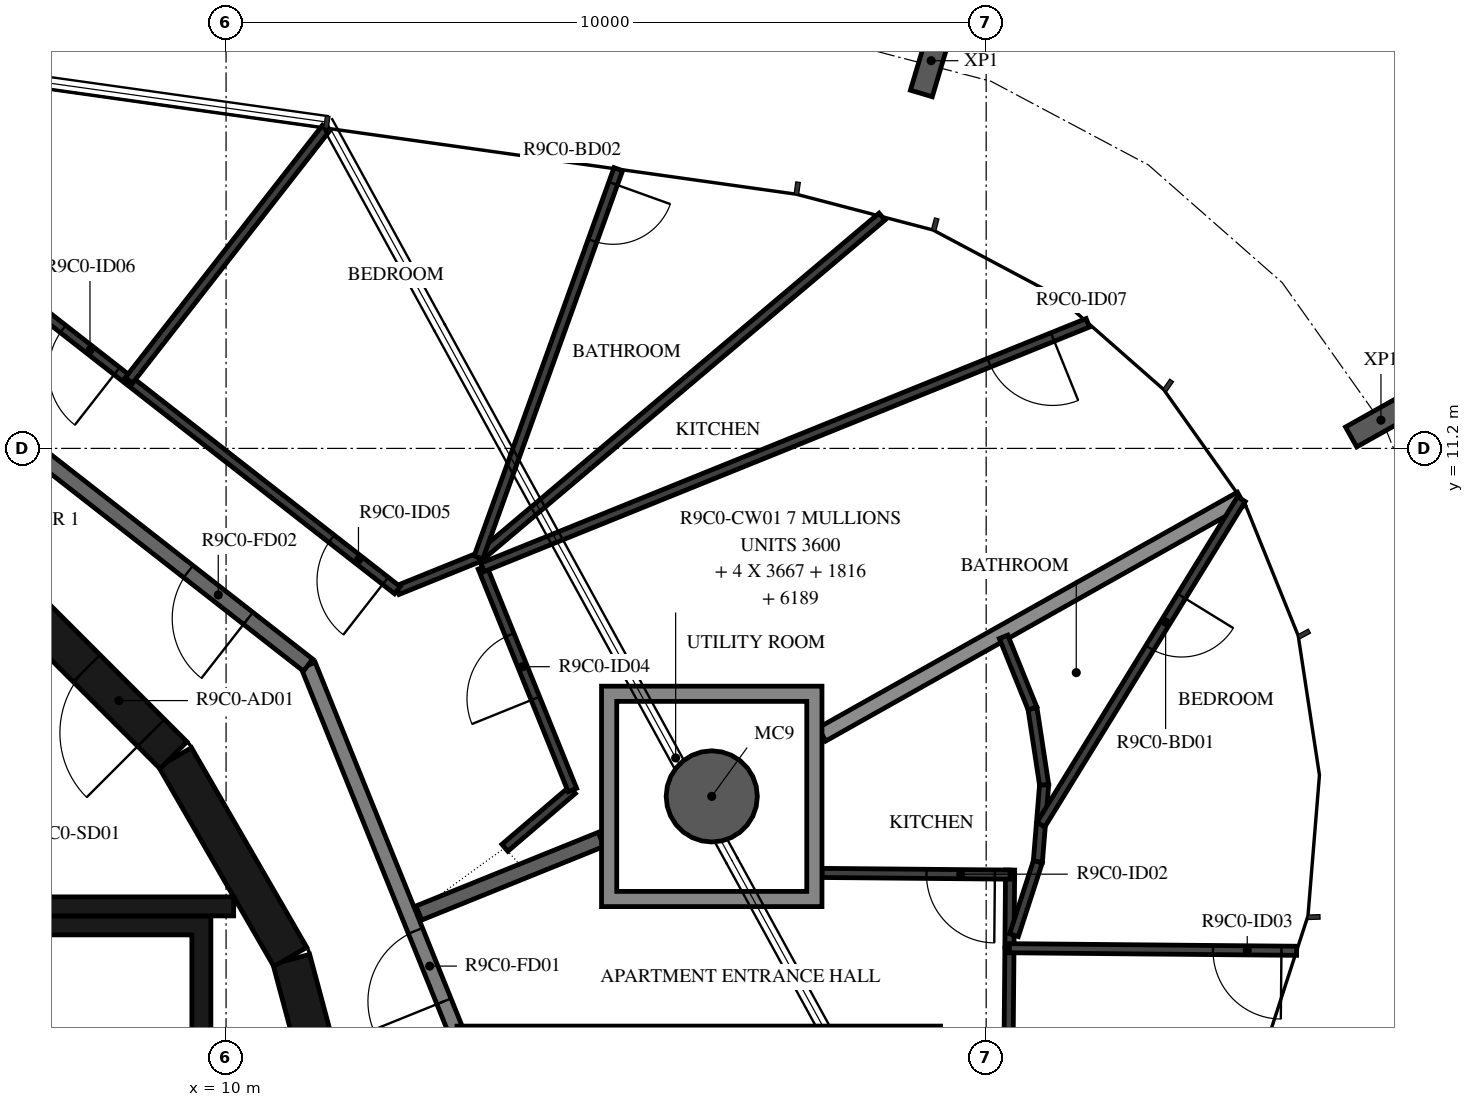
"""IFC4 building model, lengths in metres.
Left out: names, types, materials, properties, quantities, classifications, styles, units other than length and angle.
Written with IfcOpenShell. Run it as: python <this file> out.ifc"""

import sys

from ifc_helpers import new_model, si_unit, direction, frame, frame_2d, origin, origin_2d, place, context, subcontext, project, spatial, polyline, rectangle, hollow_circle, i_section, outline, extrude, element, fill, save


model = new_model("IFC4")
c1 = context("Model", 3, precision=1e-05, world=origin(), true_north=direction((0.0, 1.0)))
c2 = subcontext(c1, "Body", "Model", "MODEL_VIEW")
j1 = project(units=[si_unit("LENGTHUNIT", "METRE"), si_unit("PLANEANGLEUNIT", "RADIAN")], contexts=[c1])
p1 = place(None, origin())
s1 = spatial("IfcSite", under=j1, at=p1, CompositionType="ELEMENT")
p2 = place(p1, origin())
s2 = spatial("IfcBuilding", under=s1, at=p2, CompositionType="ELEMENT")
p3 = place(p2, frame((0.0, 0.0, 354.0)))
s3 = spatial("IfcBuildingStorey", under=s2, at=p3, CompositionType="ELEMENT", Elevation=354.0)
p4 = place(p3, frame((16.39, 6.622, -0.38), z_axis=(0.0, 0.0, 1.0), x_axis=(1.0, 0.0, 0.0)))
e1 = element("IfcColumn", 1, at=p4, inside=s3, PredefinedType="COLUMN", context=c2, shape_type="SweptSolid", body=[
    extrude(hollow_circle(Radius=0.6, WallThickness=0.03, at=origin_2d()), origin(), (0.0, 0.0, 1.0), 3.5),
])
for number, where, z_axis, x_axis in (
    (2, (25.194, 11.571, -0.38), (0.0, 0.0, 1.0), (0.49, -0.872, 0.0)),
    (3, (19.276, 16.301, -0.38), (0.0, 0.0, 1.0), (0.958, -0.286, 0.0)),
):
    element("IfcColumn", number, at=place(p3, frame(where, z_axis=z_axis, x_axis=x_axis)), inside=s3, PredefinedType="COLUMN", context=c2, shape_type="SweptSolid", body=[
        extrude(i_section(OverallWidth=0.3, OverallDepth=0.9, WebThickness=0.019, FlangeThickness=0.035, FilletRadius=0.03, at=origin_2d()), origin(), (0.0, 0.0, 1.0), 3.5),
    ])
for number, where, z_axis, x_axis in (
    (4, (11.643, 1.55, 0.0), (0.0, 0.0, 1.0), (-0.259, 0.966, 0.0)),
    (5, (10.845, 4.51, 0.0), (0.0, 0.0, 1.0), (-0.5, 0.866, 0.0)),
):
    element("IfcWall", number, at=place(p3, frame(where, z_axis=z_axis, x_axis=x_axis)), inside=s3, PredefinedType="SHEAR", context=c2, shape_type="SweptSolid", body=[
        extrude(rectangle(XDim=3.033, YDim=0.5, at=frame_2d((1.516, 0.0))), origin(), (0.0, 0.0, 1.0), 3.12),
    ])
p5 = place(p3, frame((9.308, 7.164, 0.0), z_axis=(0.0, 0.0, 1.0), x_axis=(-0.707106781187, 0.707106781187, 0.0)))
e6 = element("IfcWall", 6, at=p5, inside=s3, PredefinedType="SHEAR", context=c2, shape_type="SweptSolid", body=[
    extrude(rectangle(XDim=3.032, YDim=0.5, at=frame_2d((1.516, 0.0))), origin(), (0.0, 0.0, 1.0), 3.12),
])
p6 = place(p5, frame((0.416, 0.0, 0.0)))
e7 = element("IfcOpeningElement", 7, at=p6, cuts=e6, PredefinedType="OPENING", context=c2, shape_type="SweptSolid", body=[
    extrude(rectangle(XDim=1.2, YDim=2.1, at=frame_2d((0.6, 1.05))), frame((0.0, 0.26, 0.0), z_axis=(0.0, -1.0, 0.0), x_axis=(1.0, 0.0, 0.0)), (0.0, 0.0, 1.0), 0.52),
])
p7 = place(p3, frame((7.0, 5.175, 0.0), z_axis=(0.0, 0.0, 1.0), x_axis=(1.0, 0.0, 0.0)))
e8 = element("IfcWall", 8, at=p7, inside=s3, PredefinedType="SHEAR", context=c2, shape_type="SweptSolid", body=[
    extrude(rectangle(XDim=3.1, YDim=0.25, at=frame_2d((1.55, 0.0))), origin(), (0.0, 0.0, 1.0), 3.12),
])
p8 = place(p3, origin())
e9 = element("IfcWall", 9, at=p8, inside=s3, PredefinedType="SHEAR", context=c2, shape_type="SweptSolid", body=[
    extrude(outline(polyline([(-9.8, 1.9), (-9.55, 1.9), (-9.55, 4.8), (3.1, 4.8), (3.1, 1.9), (3.35, 1.9), (3.35, 4.8), (5.25, 4.8), (5.25, 1.9), (5.5, 1.9), (5.5, 4.8), (7.4, 4.8), (7.4, 1.9), (7.65, 1.9), (7.65, 4.8), (9.55, 4.8), (9.55, 1.9), (9.8, 1.9), (9.8, 4.8), (9.8, 5.05), (-9.8, 5.05), (-9.8, 4.8), (-9.8, 1.9)])), origin(), (0.0, 0.0, 1.0), 3.12),
])
p9 = place(p3, frame((13.769, 1.691, 0.0), z_axis=(0.0, 0.0, 1.0), x_axis=(-0.374618189599, 0.92717916932, 0.0)))
e10 = element("IfcWall", 10, at=p9, inside=s3, PredefinedType="STANDARD", context=c2, shape_type="SweptSolid", body=[
    extrude(rectangle(XDim=7.181, YDim=0.2, at=frame_2d((3.591, 0.0))), origin(), (0.0, 0.0, 1.0), 3.12),
])
p10 = place(p9, frame((2.41, 0.0, 0.0)))
e11 = element("IfcOpeningElement", 11, at=p10, cuts=e10, PredefinedType="OPENING", context=c2, shape_type="SweptSolid", body=[
    extrude(rectangle(XDim=1.0, YDim=2.1, at=frame_2d((0.5, 1.05))), frame((0.0, 0.11, 0.0), z_axis=(0.0, -1.0, 0.0), x_axis=(1.0, 0.0, 0.0)), (0.0, 0.0, 1.0), 0.22),
])
p11 = place(p3, frame((11.079, 8.349, 0.0), z_axis=(0.0, 0.0, 1.0), x_axis=(-0.78800478687, 0.615669112324, 0.0)))
e12 = element("IfcWall", 12, at=p11, inside=s3, PredefinedType="STANDARD", context=c2, shape_type="SweptSolid", body=[
    extrude(rectangle(XDim=7.181, YDim=0.2, at=frame_2d((3.591, 0.0))), origin(), (0.0, 0.0, 1.0), 3.12),
])
p12 = place(p11, frame((1.0, 0.0, 0.0)))
e13 = element("IfcOpeningElement", 13, at=p12, cuts=e12, PredefinedType="OPENING", context=c2, shape_type="SweptSolid", body=[
    extrude(rectangle(XDim=1.0, YDim=2.1, at=frame_2d((0.5, 1.05))), frame((0.0, 0.11, 0.0), z_axis=(0.0, -1.0, 0.0), x_axis=(1.0, 0.0, 0.0)), (0.0, 0.0, 1.0), 0.22),
])
p13 = place(p3, frame((19.4, 3.5, 0.0), z_axis=(0.0, 0.0, 1.0), x_axis=(-1.0, 0.0, 0.0)))
e14 = element("IfcWall", 14, at=p13, inside=s3, PredefinedType="STANDARD", context=c2, shape_type="SweptSolid", body=[
    extrude(rectangle(XDim=6.362, YDim=0.2, at=frame_2d((3.181, 0.0))), origin(), (0.0, 0.0, 1.0), 3.12),
])
p14 = place(p3, frame((14.934, 6.056, 0.0), z_axis=(0.0, 0.0, 1.0), x_axis=(-0.927181938396, -0.374611336071, 0.0)))
e15 = element("IfcWall", 15, at=p14, inside=s3, PredefinedType="STANDARD", context=c2, shape_type="SweptSolid", body=[
    extrude(rectangle(XDim=2.586, YDim=0.2, at=frame_2d((1.293, 0.0))), origin(), (0.0, 0.0, 1.0), 3.12),
])
p15 = place(p3, frame((23.354, 10.537, 0.0), z_axis=(0.0, 0.0, 1.0), x_axis=(-0.871719790551, -0.490004700754, 0.0)))
e16 = element("IfcWall", 16, at=p15, inside=s3, PredefinedType="STANDARD", context=c2, shape_type="SweptSolid", body=[
    extrude(rectangle(XDim=6.326, YDim=0.2, at=frame_2d((3.163, 0.0))), origin(), (0.0, 0.0, 1.0), 2.73),
])
p16 = place(p3, frame((20.285, 2.293, 0.0), z_axis=(0.0, 0.0, 1.0), x_axis=(0.008900171034, 0.999960392693, 0.0)))
e17 = element("IfcWall", 17, at=p16, inside=s3, PredefinedType="PARTITIONING", context=c2, shape_type="SweptSolid", body=[
    extrude(rectangle(XDim=2.332, YDim=0.12, at=frame_2d((1.166, 0.0))), origin(), (0.0, 0.0, 1.0), 3.12),
])
p17 = place(p16, frame((0.2, 0.0, 0.0)))
e18 = element("IfcOpeningElement", 18, at=p17, cuts=e17, PredefinedType="OPENING", context=c2, shape_type="SweptSolid", body=[
    extrude(rectangle(XDim=0.9, YDim=2.1, at=frame_2d((0.45, 1.05))), frame((0.0, 0.07, 0.0), z_axis=(0.0, -1.0, 0.0), x_axis=(1.0, 0.0, 0.0)), (0.0, 0.0, 1.0), 0.14),
])
p18 = place(p3, frame((20.306, 4.639, 0.0), z_axis=(0.0, 0.0, 1.0), x_axis=(0.008906724211, 0.999960334345, 0.0)))
e19 = element("IfcWall", 19, at=p18, inside=s3, PredefinedType="PARTITIONING", context=c2, shape_type="SweptSolid", body=[
    extrude(rectangle(XDim=1.014, YDim=0.12, at=frame_2d((0.507, 0.0))), origin(), (0.0, 0.0, 1.0), 3.12),
])
p19 = place(p3, frame((20.315, 5.593, 0.0), z_axis=(0.0, 0.0, 1.0), x_axis=(-0.999960597409, 0.008877140833, 0.0)))
e20 = element("IfcWall", 20, at=p19, inside=s3, PredefinedType="PARTITIONING", context=c2, shape_type="SweptSolid", body=[
    extrude(rectangle(XDim=2.475, YDim=0.12, at=frame_2d((1.238, 0.0))), origin(), (0.0, 0.0, 1.0), 3.12),
])
p20 = place(p19, frame((0.2, 0.0, 0.0)))
e21 = element("IfcOpeningElement", 21, at=p20, cuts=e20, PredefinedType="OPENING", context=c2, shape_type="SweptSolid", body=[
    extrude(rectangle(XDim=0.9, YDim=2.1, at=frame_2d((0.45, 1.05))), frame((0.0, 0.07, 0.0), z_axis=(0.0, -1.0, 0.0), x_axis=(1.0, 0.0, 0.0)), (0.0, 0.0, 1.0), 0.14),
])
p21 = place(p3, frame((24.085, 4.591, 0.0), z_axis=(0.0, 0.0, 1.0), x_axis=(-0.99996025077, 0.008916102255, 0.0)))
e22 = element("IfcWall", 22, at=p21, inside=s3, PredefinedType="PARTITIONING", context=c2, shape_type="SweptSolid", body=[
    extrude(rectangle(XDim=3.779, YDim=0.12, at=frame_2d((1.889, 0.0))), origin(), (0.0, 0.0, 1.0), 2.73),
])
p22 = place(p21, frame((0.2, 0.0, 0.0)))
e23 = element("IfcOpeningElement", 23, at=p22, cuts=e22, PredefinedType="OPENING", context=c2, shape_type="SweptSolid", body=[
    extrude(rectangle(XDim=0.9, YDim=2.1, at=frame_2d((0.45, 1.05))), frame((0.0, 0.07, 0.0), z_axis=(0.0, -1.0, 0.0), x_axis=(1.0, 0.0, 0.0)), (0.0, 0.0, 1.0), 0.14),
])
p23 = place(p3, frame((20.762, 6.775, 0.0), z_axis=(0.0, 0.0, 1.0), x_axis=(-0.08121587, -0.996696534789, 0.0)))
e24 = element("IfcWall", 24, at=p23, inside=s3, PredefinedType="PARTITIONING", context=c2, shape_type="SweptSolid", body=[
    extrude(rectangle(XDim=1.016, YDim=0.12, at=frame_2d((0.508, 0.0))), origin(), (0.0, 0.0, 1.0), 3.12),
])
p24 = place(p3, frame((20.68, 5.762, 0.0), z_axis=(0.0, 0.0, 1.0), x_axis=(-0.30908063779, -0.951035834942, 0.0)))
e25 = element("IfcWall", 25, at=p24, inside=s3, PredefinedType="PARTITIONING", context=c2, shape_type="SweptSolid", body=[
    extrude(rectangle(XDim=1.016, YDim=0.12, at=frame_2d((0.508, 0.0))), origin(), (0.0, 0.0, 1.0), 3.12),
])
p25 = place(p3, frame((23.357, 10.532, 0.0), z_axis=(0.0, 0.0, 1.0), x_axis=(-0.524476563806, -0.851424884542, 0.0)))
e26 = element("IfcWall", 26, at=p25, inside=s3, PredefinedType="PARTITIONING", context=c2, shape_type="SweptSolid", body=[
    extrude(rectangle(XDim=5.029, YDim=0.12, at=frame_2d((2.515, 0.0))), origin(), (0.0, 0.0, 1.0), 3.12),
])
p26 = place(p25, frame((1.5, 0.0, 0.0)))
e27 = element("IfcOpeningElement", 27, at=p26, cuts=e26, PredefinedType="OPENING", context=c2, shape_type="SweptSolid", body=[
    extrude(rectangle(XDim=0.8, YDim=2.1, at=frame_2d((0.4, 1.05))), frame((0.0, 0.07, 0.0), z_axis=(0.0, -1.0, 0.0), x_axis=(1.0, 0.0, 0.0)), (0.0, 0.0, 1.0), 0.14),
])
p27 = place(p3, frame((20.762, 6.775, 0.0), z_axis=(0.0, 0.0, 1.0), x_axis=(-0.150702440861, 0.988579169474, 0.0)))
e28 = element("IfcWall", 28, at=p27, inside=s3, PredefinedType="PARTITIONING", context=c2, shape_type="SweptSolid", body=[
    extrude(rectangle(XDim=1.016, YDim=0.12, at=frame_2d((0.508, 0.0))), origin(), (0.0, 0.0, 1.0), 3.12),
])
p28 = place(p3, frame((20.609, 7.779, 0.0), z_axis=(0.0, 0.0, 1.0), x_axis=(-0.374371668856, 0.927278735633, 0.0)))
e29 = element("IfcWall", 29, at=p28, inside=s3, PredefinedType="PARTITIONING", context=c2, shape_type="SweptSolid", body=[
    extrude(rectangle(XDim=1.016, YDim=0.12, at=frame_2d((0.508, 0.0))), origin(), (0.0, 0.0, 1.0), 3.12),
])
p29 = place(p3, frame((13.668, 5.946, 0.0), z_axis=(0.0, 0.0, 1.0), x_axis=(0.759993221436, 0.649930998931, 0.0)))
e30 = element("IfcWall", 30, at=p29, inside=s3, PredefinedType="PARTITIONING", context=c2, shape_type="SweptSolid", body=[
    extrude(rectangle(XDim=1.169, YDim=0.12, at=frame_2d((0.584, 0.0))), origin(), (0.0, 0.0, 1.0), 3.12),
])
p30 = place(p3, frame((14.556, 6.706, 0.0), z_axis=(0.0, 0.0, 1.0), x_axis=(-0.374599774633, 0.927186609505, 0.0)))
e31 = element("IfcWall", 31, at=p30, inside=s3, PredefinedType="PARTITIONING", context=c2, shape_type="SweptSolid", body=[
    extrude(rectangle(XDim=3.159, YDim=0.12, at=frame_2d((1.58, 0.0))), origin(), (0.0, 0.0, 1.0), 3.12),
])
p31 = place(p30, frame((1.3, 0.0, 0.0)))
e32 = element("IfcOpeningElement", 32, at=p31, cuts=e31, PredefinedType="OPENING", context=c2, shape_type="SweptSolid", body=[
    extrude(rectangle(XDim=0.9, YDim=2.1, at=frame_2d((0.45, 1.05))), frame((0.0, 0.07, 0.0), z_axis=(0.0, -1.0, 0.0), x_axis=(1.0, 0.0, 0.0)), (0.0, 0.0, 1.0), 0.14),
])
p32 = place(p3, frame((13.32, 9.765, 0.0), z_axis=(0.0, 0.0, 1.0), x_axis=(-0.92716811739, -0.37464554194, 0.0)))
e33 = element("IfcWall", 33, at=p32, inside=s3, PredefinedType="PARTITIONING", context=c2, shape_type="SweptSolid", body=[
    extrude(rectangle(XDim=1.15, YDim=0.12, at=frame_2d((0.575, 0.0))), origin(), (0.0, 0.0, 1.0), 3.12),
])
p33 = place(p3, frame((12.254, 9.334, 0.0), z_axis=(0.0, 0.0, 1.0), x_axis=(-0.787994393996, 0.615682414098, 0.0)))
e34 = element("IfcWall", 34, at=p33, inside=s3, PredefinedType="PARTITIONING", context=c2, shape_type="SweptSolid", body=[
    extrude(rectangle(XDim=7.902, YDim=0.12, at=frame_2d((3.951, 0.0))), origin(), (0.0, 0.0, 1.0), 3.12),
])
p34 = place(p33, frame((0.2, 0.0, 0.0)))
e35 = element("IfcOpeningElement", 35, at=p34, cuts=e34, PredefinedType="OPENING", context=c2, shape_type="SweptSolid", body=[
    extrude(rectangle(XDim=0.9, YDim=2.1, at=frame_2d((0.45, 1.05))), frame((0.0, 0.07, 0.0), z_axis=(0.0, -1.0, 0.0), x_axis=(1.0, 0.0, 0.0)), (0.0, 0.0, 1.0), 0.14),
])
p35 = place(p33, frame((4.683, 0.0, 0.0)))
e36 = element("IfcOpeningElement", 36, at=p35, cuts=e34, PredefinedType="OPENING", context=c2, shape_type="SweptSolid", body=[
    extrude(rectangle(XDim=0.9, YDim=2.1, at=frame_2d((0.45, 1.05))), frame((0.0, 0.07, 0.0), z_axis=(0.0, -1.0, 0.0), x_axis=(1.0, 0.0, 0.0)), (0.0, 0.0, 1.0), 0.14),
])
p36 = place(p3, frame((21.337, 12.852, 0.0), z_axis=(0.0, 0.0, 1.0), x_axis=(-0.927185271553, -0.374603086232, 0.0)))
e37 = element("IfcWall", 37, at=p36, inside=s3, PredefinedType="PARTITIONING", context=c2, shape_type="SweptSolid", body=[
    extrude(rectangle(XDim=8.59, YDim=0.12, at=frame_2d((4.295, 0.0))), origin(), (0.0, 0.0, 1.0), 3.12),
])
p37 = place(p36, frame((0.5, 0.0, 0.0)))
e38 = element("IfcOpeningElement", 38, at=p37, cuts=e37, PredefinedType="OPENING", context=c2, shape_type="SweptSolid", body=[
    extrude(rectangle(XDim=0.9, YDim=2.1, at=frame_2d((0.45, 1.05))), frame((0.0, 0.07, 0.0), z_axis=(0.0, -1.0, 0.0), x_axis=(1.0, 0.0, 0.0)), (0.0, 0.0, 1.0), 0.14),
])
p38 = place(p3, frame((18.63, 14.249, 0.0), z_axis=(0.0, 0.0, 1.0), x_axis=(-0.763997588944, -0.64521909774, 0.0)))
e39 = element("IfcWall", 39, at=p38, inside=s3, PredefinedType="PARTITIONING", context=c2, shape_type="SweptSolid", body=[
    extrude(rectangle(XDim=6.949, YDim=0.12, at=frame_2d((3.475, 0.0))), origin(), (0.0, 0.0, 1.0), 3.12),
])
p39 = place(p3, frame((15.16, 14.873, 0.0), z_axis=(0.0, 0.0, 1.0), x_axis=(-0.338881884511, -0.940828926187, 0.0)))
e40 = element("IfcWall", 40, at=p39, inside=s3, PredefinedType="PARTITIONING", context=c2, shape_type="SweptSolid", body=[
    extrude(rectangle(XDim=5.429, YDim=0.12, at=frame_2d((2.715, 0.0))), origin(), (0.0, 0.0, 1.0), 3.12),
])
p40 = place(p39, frame((0.2, 0.0, 0.0)))
e41 = element("IfcOpeningElement", 41, at=p40, cuts=e40, PredefinedType="OPENING", context=c2, shape_type="SweptSolid", body=[
    extrude(rectangle(XDim=0.8, YDim=2.1, at=frame_2d((0.4, 1.05))), frame((0.0, 0.07, 0.0), z_axis=(0.0, -1.0, 0.0), x_axis=(1.0, 0.0, 0.0)), (0.0, 0.0, 1.0), 0.14),
])
p41 = place(p3, frame((11.315, 15.414, 0.0), z_axis=(0.0, 0.0, 1.0), x_axis=(-0.615656413137, -0.788014708596, 0.0)))
e42 = element("IfcWall", 42, at=p41, inside=s3, PredefinedType="PARTITIONING", context=c2, shape_type="SweptSolid", body=[
    extrude(rectangle(XDim=4.213, YDim=0.12, at=frame_2d((2.106, 0.0))), origin(), (0.0, 0.0, 1.0), 3.12),
])
p42 = place(p3, origin())
e43 = element("IfcWall", 43, at=p42, inside=s3, PredefinedType="STANDARD", context=c2, shape_type="SweptSolid", body=[
    extrude(outline(polyline([(17.84, 8.072), (17.84, 5.172), (14.94, 5.172), (14.94, 8.072), (17.84, 8.072)]), holes=[polyline([(15.14, 5.372), (17.64, 5.372), (17.64, 7.872), (15.14, 7.872), (15.14, 5.372)])]), origin(), (0.0, 0.0, 1.0), 3.12),
])
p43 = place(p6, origin())
e44 = element("IfcDoor", 44, at=p43, inside=s3, OperationType="SINGLE_SWING_RIGHT", PredefinedType="DOOR", context=c2, shape_type="SweptSolid", body=[
    extrude(rectangle(XDim=1.2, YDim=2.1, at=frame_2d((0.6, 1.05))), frame((0.0, 0.025, 0.0), z_axis=(0.0, -1.0, 0.0), x_axis=(1.0, 0.0, 0.0)), (0.0, 0.0, 1.0), 0.05),
])
fill(e7, e44)
p44 = place(p10, origin())
e45 = element("IfcDoor", 45, at=p44, inside=s3, OperationType="SINGLE_SWING_LEFT", PredefinedType="DOOR", context=c2, shape_type="SweptSolid", body=[
    extrude(rectangle(XDim=1.0, YDim=2.1, at=frame_2d((0.5, 1.05))), frame((0.0, 0.025, 0.0), z_axis=(0.0, -1.0, 0.0), x_axis=(1.0, 0.0, 0.0)), (0.0, 0.0, 1.0), 0.05),
])
fill(e11, e45)
p45 = place(p20, origin())
e46 = element("IfcDoor", 46, at=p45, inside=s3, OperationType="SINGLE_SWING_RIGHT", PredefinedType="DOOR", context=c2, shape_type="SweptSolid", body=[
    extrude(rectangle(XDim=0.9, YDim=2.1, at=frame_2d((0.45, 1.05))), frame((0.0, 0.025, 0.0), z_axis=(0.0, -1.0, 0.0), x_axis=(1.0, 0.0, 0.0)), (0.0, 0.0, 1.0), 0.05),
])
fill(e21, e46)
p46 = place(p22, origin())
e47 = element("IfcDoor", 47, at=p46, inside=s3, OperationType="SINGLE_SWING_RIGHT", PredefinedType="DOOR", context=c2, shape_type="SweptSolid", body=[
    extrude(rectangle(XDim=0.9, YDim=2.1, at=frame_2d((0.45, 1.05))), frame((0.0, 0.025, 0.0), z_axis=(0.0, -1.0, 0.0), x_axis=(1.0, 0.0, 0.0)), (0.0, 0.0, 1.0), 0.05),
])
fill(e23, e47)
p47 = place(p26, origin())
e48 = element("IfcDoor", 48, at=p47, inside=s3, OperationType="SINGLE_SWING_RIGHT", PredefinedType="DOOR", context=c2, shape_type="SweptSolid", body=[
    extrude(rectangle(XDim=0.8, YDim=2.1, at=frame_2d((0.4, 1.05))), frame((0.0, 0.025, 0.0), z_axis=(0.0, -1.0, 0.0), x_axis=(1.0, 0.0, 0.0)), (0.0, 0.0, 1.0), 0.05),
])
fill(e27, e48)
p48 = place(p12, origin())
e49 = element("IfcDoor", 49, at=p48, inside=s3, OperationType="SINGLE_SWING_LEFT", PredefinedType="DOOR", context=c2, shape_type="SweptSolid", body=[
    extrude(rectangle(XDim=1.0, YDim=2.1, at=frame_2d((0.5, 1.05))), frame((0.0, 0.025, 0.0), z_axis=(0.0, -1.0, 0.0), x_axis=(1.0, 0.0, 0.0)), (0.0, 0.0, 1.0), 0.05),
])
fill(e13, e49)
p49 = place(p31, origin())
e50 = element("IfcDoor", 50, at=p49, inside=s3, OperationType="SINGLE_SWING_LEFT", PredefinedType="DOOR", context=c2, shape_type="SweptSolid", body=[
    extrude(rectangle(XDim=0.9, YDim=2.1, at=frame_2d((0.45, 1.05))), frame((0.0, 0.025, 0.0), z_axis=(0.0, -1.0, 0.0), x_axis=(1.0, 0.0, 0.0)), (0.0, 0.0, 1.0), 0.05),
])
fill(e32, e50)
p50 = place(p34, origin())
e51 = element("IfcDoor", 51, at=p50, inside=s3, OperationType="SINGLE_SWING_LEFT", PredefinedType="DOOR", context=c2, shape_type="SweptSolid", body=[
    extrude(rectangle(XDim=0.9, YDim=2.1, at=frame_2d((0.45, 1.05))), frame((0.0, 0.025, 0.0), z_axis=(0.0, -1.0, 0.0), x_axis=(1.0, 0.0, 0.0)), (0.0, 0.0, 1.0), 0.05),
])
fill(e35, e51)
p51 = place(p35, origin())
e52 = element("IfcDoor", 52, at=p51, inside=s3, OperationType="SINGLE_SWING_LEFT", PredefinedType="DOOR", context=c2, shape_type="SweptSolid", body=[
    extrude(rectangle(XDim=0.9, YDim=2.1, at=frame_2d((0.45, 1.05))), frame((0.0, 0.025, 0.0), z_axis=(0.0, -1.0, 0.0), x_axis=(1.0, 0.0, 0.0)), (0.0, 0.0, 1.0), 0.05),
])
fill(e36, e52)
p52 = place(p37, origin())
e53 = element("IfcDoor", 53, at=p52, inside=s3, OperationType="SINGLE_SWING_RIGHT", PredefinedType="DOOR", context=c2, shape_type="SweptSolid", body=[
    extrude(rectangle(XDim=0.9, YDim=2.1, at=frame_2d((0.45, 1.05))), frame((0.0, 0.025, 0.0), z_axis=(0.0, -1.0, 0.0), x_axis=(1.0, 0.0, 0.0)), (0.0, 0.0, 1.0), 0.05),
])
fill(e38, e53)
p53 = place(p40, origin())
e54 = element("IfcDoor", 54, at=p53, inside=s3, OperationType="SINGLE_SWING_LEFT", PredefinedType="DOOR", context=c2, shape_type="SweptSolid", body=[
    extrude(rectangle(XDim=0.8, YDim=2.1, at=frame_2d((0.4, 1.05))), frame((0.0, 0.025, 0.0), z_axis=(0.0, -1.0, 0.0), x_axis=(1.0, 0.0, 0.0)), (0.0, 0.0, 1.0), 0.05),
])
fill(e41, e54)
save(model, sys.argv[1])
